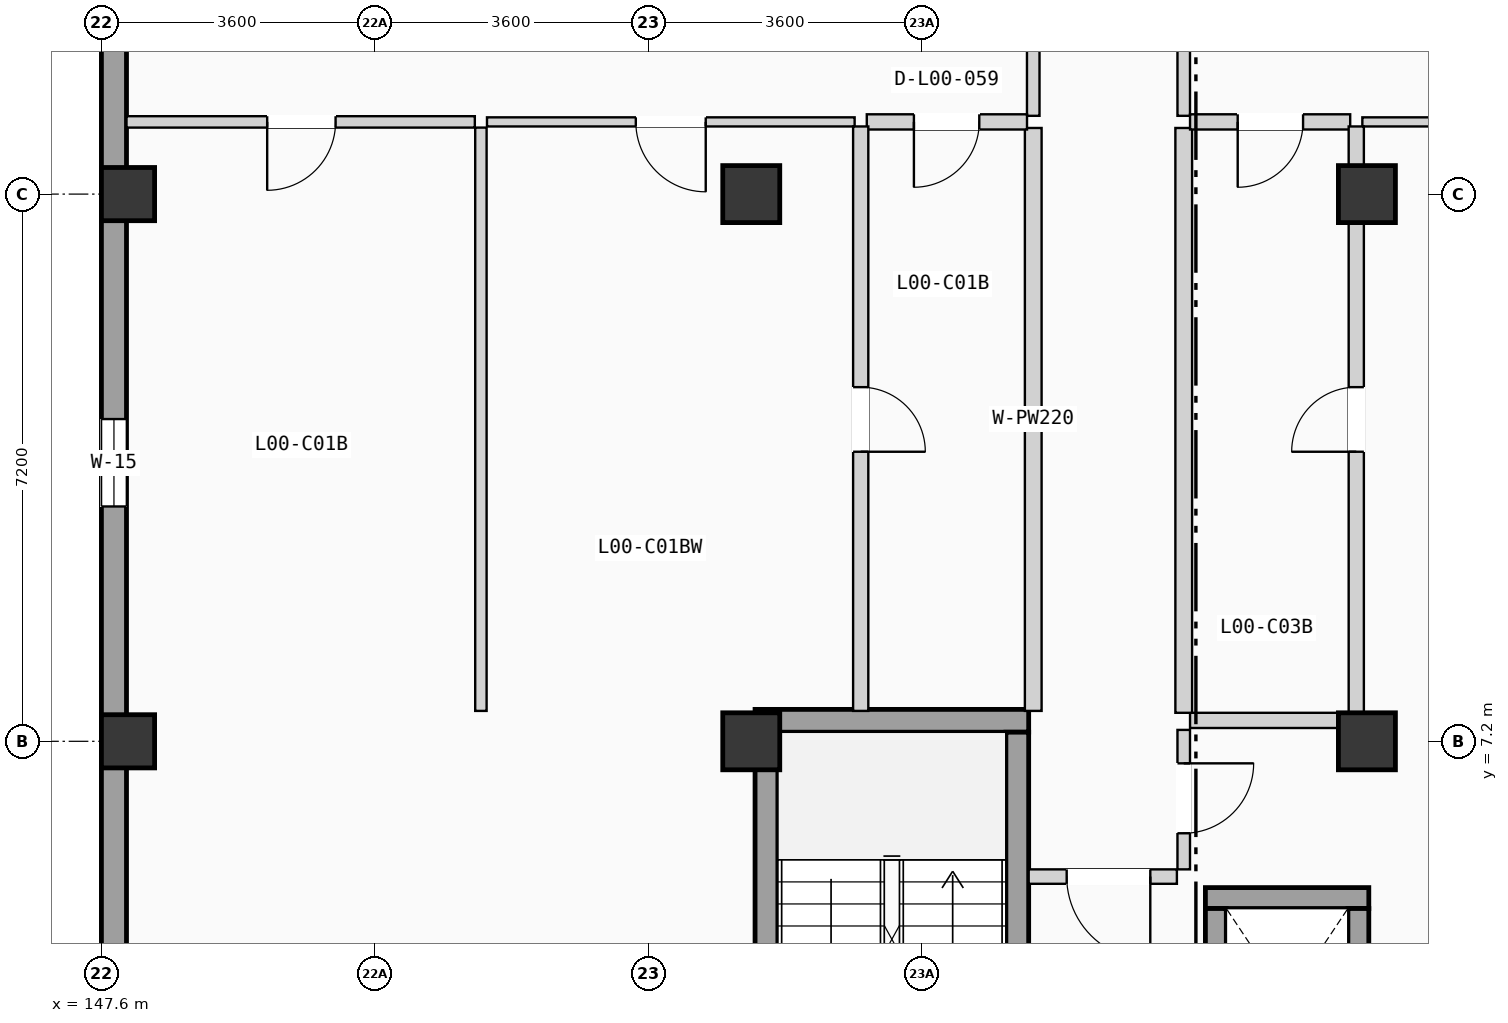
"""IFC4 building model, lengths in metres.
Left out: names, types, materials, properties, quantities, classifications, styles, units other than length and angle.
Written with IfcOpenShell. Run it as: python <this file> out.ifc"""

import sys

from ifc_helpers import new_model, si_unit, direction, frame, frame_2d, origin, origin_2d, place, context, subcontext, project, spatial, rectangle, extrude, element, fill, save


model = new_model("IFC4")
c1 = context("Model", 3, precision=1e-05, world=origin(), true_north=direction((0.0, 1.0)))
c2 = subcontext(c1, "Body", "Model", "MODEL_VIEW")
j1 = project(units=[si_unit("LENGTHUNIT", "METRE"), si_unit("PLANEANGLEUNIT", "RADIAN")], contexts=[c1])
p1 = place(None, origin())
s1 = spatial("IfcSite", under=j1, at=p1, CompositionType="ELEMENT")
p2 = place(p1, origin())
s2 = spatial("IfcBuilding", under=s1, at=p2, CompositionType="ELEMENT")
p3 = place(p2, origin())
s3 = spatial("IfcBuildingStorey", under=s2, at=p3, CompositionType="ELEMENT", Elevation=0.0)
for number, where, z_axis, x_axis in (
    (1, (147.95, 7.2, 0.0), (0.0, 0.0, 1.0), (1.0, 0.0, 0.0)),
    (2, (147.95, 14.4, 0.0), (0.0, 0.0, 1.0), (1.0, 0.0, 0.0)),
):
    element("IfcColumn", number, at=place(p3, frame(where, z_axis=z_axis, x_axis=x_axis)), inside=s3, PredefinedType="COLUMN", context=c2, shape_type="SweptSolid", body=[
        extrude(rectangle(XDim=0.7, YDim=0.7, at=origin_2d()), origin(), (0.0, 0.0, 1.0), 4.9),
    ])
for number, where, z_axis, x_axis in (
    (3, (156.15, 7.2, 0.0), (0.0, 0.0, 1.0), (1.0, 0.0, 0.0)),
    (4, (156.15, 14.4, 0.0), (0.0, 0.0, 1.0), (1.0, 0.0, 0.0)),
    (5, (164.25, 7.2, 0.0), (0.0, 0.0, 1.0), (1.0, 0.0, 0.0)),
    (6, (164.25, 14.4, 0.0), (0.0, 0.0, 1.0), (1.0, 0.0, 0.0)),
):
    element("IfcColumn", number, at=place(p3, frame(where, z_axis=z_axis, x_axis=x_axis)), inside=s3, PredefinedType="COLUMN", context=c2, shape_type="SweptSolid", body=[
        extrude(rectangle(XDim=0.75, YDim=0.75, at=origin_2d()), origin(), (0.0, 0.0, 1.0), 4.9),
    ])
p4 = place(p3, frame((147.765, 0.33, 0.0), z_axis=(0.0, 0.0, 1.0), x_axis=(0.0, 1.0, 0.0)))
e7 = element("IfcWall", 7, at=p4, inside=s3, PredefinedType="SOLIDWALL", context=c2, shape_type="SweptSolid", body=[
    extrude(rectangle(XDim=49.74, YDim=0.33, at=frame_2d((24.87, 0.0))), origin(), (0.0, 0.0, 1.0), 4.64),
])
p5 = place(p4, frame((17.095, 0.0, 0.9)))
e8 = element("IfcOpeningElement", 8, at=p5, cuts=e7, PredefinedType="OPENING", context=c2, shape_type="SweptSolid", body=[
    extrude(rectangle(XDim=1.15, YDim=1.65, at=frame_2d((0.575, 0.825))), frame((0.0, 0.175, 0.0), z_axis=(0.0, -1.0, 0.0), x_axis=(1.0, 0.0, 0.0)), (0.0, 0.0, 1.0), 0.35),
])
p6 = place(p4, frame((9.96, 0.0, 0.9)))
e9 = element("IfcOpeningElement", 9, at=p6, cuts=e7, PredefinedType="OPENING", context=c2, shape_type="SweptSolid", body=[
    extrude(rectangle(XDim=1.15, YDim=1.8, at=frame_2d((0.575, 0.9))), frame((0.0, 0.175, 0.0), z_axis=(0.0, -1.0, 0.0), x_axis=(1.0, 0.0, 0.0)), (0.0, 0.0, 1.0), 0.35),
])
p7 = place(p4, frame((24.245, 0.0, 0.9)))
e10 = element("IfcOpeningElement", 10, at=p7, cuts=e7, PredefinedType="OPENING", context=c2, shape_type="SweptSolid", body=[
    extrude(rectangle(XDim=1.25, YDim=1.2, at=frame_2d((0.625, 0.6))), frame((0.0, 0.175, 0.0), z_axis=(0.0, -1.0, 0.0), x_axis=(1.0, 0.0, 0.0)), (0.0, 0.0, 1.0), 0.35),
])
p8 = place(p4, frame((33.523, 0.0, 0.9)))
e11 = element("IfcOpeningElement", 11, at=p8, cuts=e7, PredefinedType="OPENING", context=c2, shape_type="SweptSolid", body=[
    extrude(rectangle(XDim=1.25, YDim=1.35, at=frame_2d((0.625, 0.675))), frame((0.0, 0.175, 0.0), z_axis=(0.0, -1.0, 0.0), x_axis=(1.0, 0.0, 0.0)), (0.0, 0.0, 1.0), 0.35),
])
p9 = place(p4, frame((30.114, 0.0, 0.9)))
e12 = element("IfcOpeningElement", 12, at=p9, cuts=e7, PredefinedType="OPENING", context=c2, shape_type="SweptSolid", body=[
    extrude(rectangle(XDim=1.25, YDim=1.5, at=frame_2d((0.625, 0.75))), frame((0.0, 0.175, 0.0), z_axis=(0.0, -1.0, 0.0), x_axis=(1.0, 0.0, 0.0)), (0.0, 0.0, 1.0), 0.35),
])
p10 = place(p4, frame((39.716, 0.0, 0.9)))
e13 = element("IfcOpeningElement", 13, at=p10, cuts=e7, PredefinedType="OPENING", context=c2, shape_type="SweptSolid", body=[
    extrude(rectangle(XDim=1.25, YDim=1.65, at=frame_2d((0.625, 0.825))), frame((0.0, 0.175, 0.0), z_axis=(0.0, -1.0, 0.0), x_axis=(1.0, 0.0, 0.0)), (0.0, 0.0, 1.0), 0.35),
])
p11 = place(p3, frame((156.2, 7.47, 0.0), z_axis=(0.0, 0.0, 1.0), x_axis=(1.0, 0.0, 0.0)))
e14 = element("IfcWall", 14, at=p11, inside=s3, PredefinedType="SHEAR", context=c2, shape_type="SweptSolid", body=[
    extrude(rectangle(XDim=3.6, YDim=0.3, at=frame_2d((1.8, 0.0))), origin(), (0.0, 0.0, 1.0), 4.64),
])
p12 = place(p3, frame((156.35, 0.32, 0.0), z_axis=(0.0, 0.0, 1.0), x_axis=(0.0, 1.0, 0.0)))
e15 = element("IfcWall", 15, at=p12, inside=s3, PredefinedType="SHEAR", context=c2, shape_type="SweptSolid", body=[
    extrude(rectangle(XDim=7.0, YDim=0.3, at=frame_2d((3.5, 0.0))), origin(), (0.0, 0.0, 1.0), 4.64),
])
p13 = place(p3, frame((159.65, 0.32, 0.0), z_axis=(0.0, 0.0, 1.0), x_axis=(0.0, 1.0, 0.0)))
e16 = element("IfcWall", 16, at=p13, inside=s3, PredefinedType="SHEAR", context=c2, shape_type="SweptSolid", body=[
    extrude(rectangle(XDim=7.0, YDim=0.3, at=frame_2d((3.5, 0.0))), origin(), (0.0, 0.0, 1.0), 4.64),
])
p14 = place(p13, frame((0.225, 0.0, 0.0)))
e17 = element("IfcOpeningElement", 17, at=p14, cuts=e16, PredefinedType="OPENING", context=c2, shape_type="SweptSolid", body=[
    extrude(rectangle(XDim=1.15, YDim=2.12, at=frame_2d((0.575, 1.06))), frame((0.0, 0.16, 0.0), z_axis=(0.0, -1.0, 0.0), x_axis=(1.0, 0.0, 0.0)), (0.0, 0.0, 1.0), 0.32),
])
p15 = place(p3, frame((162.125, 5.137, 0.0), z_axis=(0.0, 0.0, 1.0), x_axis=(1.0, 0.0, 0.0)))
e18 = element("IfcWall", 18, at=p15, inside=s3, PredefinedType="SHEAR", context=c2, shape_type="SweptSolid", body=[
    extrude(rectangle(XDim=2.15, YDim=0.275, at=frame_2d((1.075, 0.0))), origin(), (0.0, 0.0, 1.0), 4.64),
])
p16 = place(p3, frame((162.262, 2.6, 0.0), z_axis=(0.0, 0.0, 1.0), x_axis=(0.0, 1.0, 0.0)))
e19 = element("IfcWall", 19, at=p16, inside=s3, PredefinedType="SHEAR", context=c2, shape_type="SweptSolid", body=[
    extrude(rectangle(XDim=2.4, YDim=0.275, at=frame_2d((1.2, 0.0))), origin(), (0.0, 0.0, 1.0), 4.64),
])
p17 = place(p16, frame((0.65, 0.0, 0.0)))
e20 = element("IfcOpeningElement", 20, at=p17, cuts=e19, PredefinedType="OPENING", context=c2, shape_type="SweptSolid", body=[
    extrude(rectangle(XDim=1.1, YDim=2.15, at=frame_2d((0.55, 1.075))), frame((0.0, 0.147, 0.0), z_axis=(0.0, -1.0, 0.0), x_axis=(1.0, 0.0, 0.0)), (0.0, 0.0, 1.0), 0.295),
])
p18 = place(p3, frame((164.137, 2.6, 0.0), z_axis=(0.0, 0.0, 1.0), x_axis=(0.0, 1.0, 0.0)))
e21 = element("IfcWall", 21, at=p18, inside=s3, PredefinedType="SHEAR", context=c2, shape_type="SweptSolid", body=[
    extrude(rectangle(XDim=2.4, YDim=0.275, at=frame_2d((1.2, 0.0))), origin(), (0.0, 0.0, 1.0), 4.64),
])
p19 = place(p3, frame((159.8, 5.42, 0.0), z_axis=(0.0, 0.0, 1.0), x_axis=(1.0, 0.0, 0.0)))
e22 = element("IfcWall", 22, at=p19, inside=s3, PredefinedType="PARTITIONING", context=c2, shape_type="SweptSolid", body=[
    extrude(rectangle(XDim=1.95, YDim=0.19, at=frame_2d((0.975, 0.0))), origin(), (0.0, 0.0, 1.0), 3.84),
])
p20 = place(p19, frame((0.5, 0.0, 0.0)))
e23 = element("IfcOpeningElement", 23, at=p20, cuts=e22, PredefinedType="OPENING", context=c2, shape_type="SweptSolid", body=[
    extrude(rectangle(XDim=1.1, YDim=2.12, at=frame_2d((0.55, 1.06))), frame((0.0, 0.105, 0.0), z_axis=(0.0, -1.0, 0.0), x_axis=(1.0, 0.0, 0.0)), (0.0, 0.0, 1.0), 0.21),
])
p21 = place(p3, frame((161.84, 5.515, 0.0), z_axis=(0.0, 0.0, 1.0), x_axis=(0.0, 1.0, 0.0)))
e24 = element("IfcWall", 24, at=p21, inside=s3, PredefinedType="PARTITIONING", context=c2, shape_type="SweptSolid", body=[
    extrude(rectangle(XDim=1.835, YDim=0.165, at=frame_2d((0.917, 0.0))), origin(), (0.0, 0.0, 1.0), 3.84),
])
p22 = place(p21, frame((0.475, 0.0, 0.0)))
e25 = element("IfcOpeningElement", 25, at=p22, cuts=e24, PredefinedType="OPENING", context=c2, shape_type="SweptSolid", body=[
    extrude(rectangle(XDim=0.92, YDim=2.04, at=frame_2d((0.46, 1.02))), frame((0.0, 0.093, 0.0), z_axis=(0.0, -1.0, 0.0), x_axis=(1.0, 0.0, 0.0)), (0.0, 0.0, 1.0), 0.185),
])
p23 = place(p3, frame((161.923, 7.475, 0.0), z_axis=(0.0, 0.0, 1.0), x_axis=(1.0, 0.0, 0.0)))
e26 = element("IfcWall", 26, at=p23, inside=s3, PredefinedType="PLUMBINGWALL", context=c2, shape_type="SweptSolid", body=[
    extrude(rectangle(XDim=2.107, YDim=0.2, at=frame_2d((1.053, 0.0))), origin(), (0.0, 0.0, 1.0), 3.84),
])
p24 = place(p3, frame((159.86, 15.43, 0.0), z_axis=(0.0, 0.0, 1.0), x_axis=(0.0, 1.0, 0.0)))
e27 = element("IfcWall", 27, at=p24, inside=s3, PredefinedType="PARTITIONING", context=c2, shape_type="SweptSolid", body=[
    extrude(rectangle(XDim=5.14, YDim=0.165, at=frame_2d((2.57, 0.0))), origin(), (0.0, 0.0, 1.0), 3.84),
])
p25 = place(p24, frame((2.065, 0.0, 0.0)))
e28 = element("IfcOpeningElement", 28, at=p25, cuts=e27, PredefinedType="OPENING", context=c2, shape_type="SweptSolid", body=[
    extrude(rectangle(XDim=1.01, YDim=2.11, at=frame_2d((0.505, 1.055))), frame((0.0, 0.093, 0.0), z_axis=(0.0, -1.0, 0.0), x_axis=(1.0, 0.0, 0.0)), (0.0, 0.0, 1.0), 0.185),
])
p26 = place(p3, frame((159.86, 7.6, 0.0), z_axis=(0.0, 0.0, 1.0), x_axis=(0.0, 1.0, 0.0)))
e29 = element("IfcWall", 29, at=p26, inside=s3, PredefinedType="PLUMBINGWALL", context=c2, shape_type="SweptSolid", body=[
    extrude(rectangle(XDim=7.67, YDim=0.22, at=frame_2d((3.835, 0.0))), origin(), (0.0, 0.0, 1.0), 3.84),
])
p27 = place(p3, frame((161.84, 15.43, 0.0), z_axis=(0.0, 0.0, 1.0), x_axis=(0.0, 1.0, 0.0)))
e30 = element("IfcWall", 30, at=p27, inside=s3, PredefinedType="PARTITIONING", context=c2, shape_type="SweptSolid", body=[
    extrude(rectangle(XDim=5.14, YDim=0.165, at=frame_2d((2.57, 0.0))), origin(), (0.0, 0.0, 1.0), 3.84),
])
p28 = place(p27, frame((2.065, 0.0, 0.0)))
e31 = element("IfcOpeningElement", 31, at=p28, cuts=e30, PredefinedType="OPENING", context=c2, shape_type="SweptSolid", body=[
    extrude(rectangle(XDim=1.01, YDim=2.11, at=frame_2d((0.505, 1.055))), frame((0.0, 0.093, 0.0), z_axis=(0.0, -1.0, 0.0), x_axis=(1.0, 0.0, 0.0)), (0.0, 0.0, 1.0), 0.185),
])
p29 = place(p3, frame((161.84, 7.575, 0.0), z_axis=(0.0, 0.0, 1.0), x_axis=(0.0, 1.0, 0.0)))
e32 = element("IfcWall", 32, at=p29, inside=s3, PredefinedType="PLUMBINGWALL", context=c2, shape_type="SweptSolid", body=[
    extrude(rectangle(XDim=7.695, YDim=0.22, at=frame_2d((3.848, 0.0))), origin(), (0.0, 0.0, 1.0), 3.84),
])
p30 = place(p3, frame((157.67, 15.35, 0.0), z_axis=(0.0, 0.0, 1.0), x_axis=(1.0, 0.0, 0.0)))
e33 = element("IfcWall", 33, at=p30, inside=s3, PredefinedType="PLUMBINGWALL", context=c2, shape_type="SweptSolid", body=[
    extrude(rectangle(XDim=2.108, YDim=0.2, at=frame_2d((1.054, 0.0))), origin(), (0.0, 0.0, 1.0), 3.84),
])
p31 = place(p30, frame((0.62, 0.0, 0.0)))
e34 = element("IfcOpeningElement", 34, at=p31, cuts=e33, PredefinedType="OPENING", context=c2, shape_type="SweptSolid", body=[
    extrude(rectangle(XDim=0.86, YDim=2.0, at=frame_2d((0.43, 1.0))), frame((0.0, 0.11, 0.0), z_axis=(0.0, -1.0, 0.0), x_axis=(1.0, 0.0, 0.0)), (0.0, 0.0, 1.0), 0.22),
])
p32 = place(p3, frame((147.93, 15.35, 0.0), z_axis=(0.0, 0.0, 1.0), x_axis=(1.0, 0.0, 0.0)))
e35 = element("IfcWall", 35, at=p32, inside=s3, PredefinedType="PARTITIONING", context=c2, shape_type="SweptSolid", body=[
    extrude(rectangle(XDim=4.583, YDim=0.15, at=frame_2d((2.292, 0.0))), origin(), (0.0, 0.0, 1.0), 3.84),
])
p33 = place(p32, frame((1.851, 0.0, 0.0)))
e36 = element("IfcOpeningElement", 36, at=p33, cuts=e35, PredefinedType="OPENING", context=c2, shape_type="SweptSolid", body=[
    extrude(rectangle(XDim=0.9, YDim=2.04, at=frame_2d((0.45, 1.02))), frame((0.0, 0.085, 0.0), z_axis=(0.0, -1.0, 0.0), x_axis=(1.0, 0.0, 0.0)), (0.0, 0.0, 1.0), 0.17),
])
p34 = place(p3, frame((152.673, 15.35, 0.0), z_axis=(0.0, 0.0, 1.0), x_axis=(1.0, 0.0, 0.0)))
e37 = element("IfcWall", 37, at=p34, inside=s3, PredefinedType="PARTITIONING", context=c2, shape_type="SweptSolid", body=[
    extrude(rectangle(XDim=4.837, YDim=0.12, at=frame_2d((2.418, 0.0))), origin(), (0.0, 0.0, 1.0), 3.84),
])
p35 = place(p34, frame((1.958, 0.0, 0.0)))
e38 = element("IfcOpeningElement", 38, at=p35, cuts=e37, PredefinedType="OPENING", context=c2, shape_type="SweptSolid", body=[
    extrude(rectangle(XDim=0.92, YDim=2.02, at=frame_2d((0.46, 1.01))), frame((0.0, 0.07, 0.0), z_axis=(0.0, -1.0, 0.0), x_axis=(1.0, 0.0, 0.0)), (0.0, 0.0, 1.0), 0.14),
])
p36 = place(p3, frame((157.59, 7.6, 0.0), z_axis=(0.0, 0.0, 1.0), x_axis=(0.0, 1.0, 0.0)))
e39 = element("IfcWall", 39, at=p36, inside=s3, PredefinedType="PLUMBINGWALL", context=c2, shape_type="SweptSolid", body=[
    extrude(rectangle(XDim=7.69, YDim=0.2, at=frame_2d((3.845, 0.0))), origin(), (0.0, 0.0, 1.0), 3.84),
])
p37 = place(p36, frame((3.41, 0.0, 0.0)))
e40 = element("IfcOpeningElement", 40, at=p37, cuts=e39, PredefinedType="OPENING", context=c2, shape_type="SweptSolid", body=[
    extrude(rectangle(XDim=0.85, YDim=2.01, at=frame_2d((0.425, 1.005))), frame((0.0, 0.11, 0.0), z_axis=(0.0, -1.0, 0.0), x_axis=(1.0, 0.0, 0.0)), (0.0, 0.0, 1.0), 0.22),
])
p38 = place(p3, frame((152.593, 7.6, 0.0), z_axis=(0.0, 0.0, 1.0), x_axis=(0.0, 1.0, 0.0)))
e41 = element("IfcWall", 41, at=p38, inside=s3, PredefinedType="PARTITIONING", context=c2, shape_type="SweptSolid", body=[
    extrude(rectangle(XDim=7.675, YDim=0.15, at=frame_2d((3.837, 0.0))), origin(), (0.0, 0.0, 1.0), 3.84),
])
p39 = place(p3, frame((161.923, 15.35, 0.0), z_axis=(0.0, 0.0, 1.0), x_axis=(1.0, 0.0, 0.0)))
e42 = element("IfcWall", 42, at=p39, inside=s3, PredefinedType="PLUMBINGWALL", context=c2, shape_type="SweptSolid", body=[
    extrude(rectangle(XDim=2.107, YDim=0.2, at=frame_2d((1.053, 0.0))), origin(), (0.0, 0.0, 1.0), 3.84),
])
p40 = place(p39, frame((0.627, 0.0, 0.0)))
e43 = element("IfcOpeningElement", 43, at=p40, cuts=e42, PredefinedType="OPENING", context=c2, shape_type="SweptSolid", body=[
    extrude(rectangle(XDim=0.86, YDim=2.0, at=frame_2d((0.43, 1.0))), frame((0.0, 0.11, 0.0), z_axis=(0.0, -1.0, 0.0), x_axis=(1.0, 0.0, 0.0)), (0.0, 0.0, 1.0), 0.22),
])
p41 = place(p3, frame((164.19, 15.35, 0.0), z_axis=(0.0, 0.0, 1.0), x_axis=(1.0, 0.0, 0.0)))
e44 = element("IfcWall", 44, at=p41, inside=s3, PredefinedType="PARTITIONING", context=c2, shape_type="SweptSolid", body=[
    extrude(rectangle(XDim=3.537, YDim=0.12, at=frame_2d((1.769, 0.0))), origin(), (0.0, 0.0, 1.0), 3.84),
])
p42 = place(p41, frame((1.329, 0.0, 0.0)))
e45 = element("IfcOpeningElement", 45, at=p42, cuts=e44, PredefinedType="OPENING", context=c2, shape_type="SweptSolid", body=[
    extrude(rectangle(XDim=0.88, YDim=2.02, at=frame_2d((0.44, 1.01))), frame((0.0, 0.07, 0.0), z_axis=(0.0, -1.0, 0.0), x_axis=(1.0, 0.0, 0.0)), (0.0, 0.0, 1.0), 0.14),
])
p43 = place(p3, frame((164.11, 7.575, 0.0), z_axis=(0.0, 0.0, 1.0), x_axis=(0.0, 1.0, 0.0)))
e46 = element("IfcWall", 46, at=p43, inside=s3, PredefinedType="PLUMBINGWALL", context=c2, shape_type="SweptSolid", body=[
    extrude(rectangle(XDim=7.715, YDim=0.2, at=frame_2d((3.857, 0.0))), origin(), (0.0, 0.0, 1.0), 3.84),
])
p44 = place(p43, frame((3.435, 0.0, 0.0)))
e47 = element("IfcOpeningElement", 47, at=p44, cuts=e46, PredefinedType="OPENING", context=c2, shape_type="SweptSolid", body=[
    extrude(rectangle(XDim=0.85, YDim=2.01, at=frame_2d((0.425, 1.005))), frame((0.0, 0.11, 0.0), z_axis=(0.0, -1.0, 0.0), x_axis=(1.0, 0.0, 0.0)), (0.0, 0.0, 1.0), 0.22),
])
p45 = place(p6, origin())
e48 = element("IfcWindow", 48, at=p45, inside=s3, PartitioningType="SINGLE_PANEL", PredefinedType="WINDOW", context=c2, shape_type="SweptSolid", body=[
    extrude(rectangle(XDim=1.15, YDim=1.8, at=frame_2d((0.575, 0.9))), frame((0.0, 0.03, 0.0), z_axis=(0.0, -1.0, 0.0), x_axis=(1.0, 0.0, 0.0)), (0.0, 0.0, 1.0), 0.06),
])
fill(e9, e48)
p46 = place(p20, frame((1.1, 0.0, 0.0), z_axis=(0.0, 0.0, 1.0), x_axis=(-1.0, 0.0, 0.0)))
e49 = element("IfcDoor", 49, at=p46, inside=s3, OperationType="SINGLE_SWING_RIGHT", PredefinedType="DOOR", context=c2, shape_type="SweptSolid", body=[
    extrude(rectangle(XDim=1.1, YDim=2.12, at=frame_2d((0.55, 1.06))), frame((0.0, 0.025, 0.0), z_axis=(0.0, -1.0, 0.0), x_axis=(1.0, 0.0, 0.0)), (0.0, 0.0, 1.0), 0.05),
])
fill(e23, e49)
p47 = place(p22, frame((0.92, 0.0, 0.0), z_axis=(0.0, 0.0, 1.0), x_axis=(-1.0, 0.0, 0.0)))
e50 = element("IfcDoor", 50, at=p47, inside=s3, OperationType="SINGLE_SWING_RIGHT", PredefinedType="DOOR", context=c2, shape_type="SweptSolid", body=[
    extrude(rectangle(XDim=0.92, YDim=2.04, at=frame_2d((0.46, 1.02))), frame((0.0, 0.025, 0.0), z_axis=(0.0, -1.0, 0.0), x_axis=(1.0, 0.0, 0.0)), (0.0, 0.0, 1.0), 0.05),
])
fill(e25, e50)
p48 = place(p31, frame((0.86, 0.0, 0.0), z_axis=(0.0, 0.0, 1.0), x_axis=(-1.0, 0.0, 0.0)))
e51 = element("IfcDoor", 51, at=p48, inside=s3, OperationType="SINGLE_SWING_LEFT", PredefinedType="DOOR", context=c2, shape_type="SweptSolid", body=[
    extrude(rectangle(XDim=0.86, YDim=2.0, at=frame_2d((0.43, 1.0))), frame((0.0, 0.025, 0.0), z_axis=(0.0, -1.0, 0.0), x_axis=(1.0, 0.0, 0.0)), (0.0, 0.0, 1.0), 0.05),
])
fill(e34, e51)
p49 = place(p33, frame((0.9, 0.0, 0.0), z_axis=(0.0, 0.0, 1.0), x_axis=(-1.0, 0.0, 0.0)))
e52 = element("IfcDoor", 52, at=p49, inside=s3, OperationType="SINGLE_SWING_LEFT", PredefinedType="DOOR", context=c2, shape_type="SweptSolid", body=[
    extrude(rectangle(XDim=0.9, YDim=2.04, at=frame_2d((0.45, 1.02))), frame((0.0, 0.025, 0.0), z_axis=(0.0, -1.0, 0.0), x_axis=(1.0, 0.0, 0.0)), (0.0, 0.0, 1.0), 0.05),
])
fill(e36, e52)
p50 = place(p35, frame((0.92, 0.0, 0.0), z_axis=(0.0, 0.0, 1.0), x_axis=(-1.0, 0.0, 0.0)))
e53 = element("IfcDoor", 53, at=p50, inside=s3, OperationType="SINGLE_SWING_RIGHT", PredefinedType="DOOR", context=c2, shape_type="SweptSolid", body=[
    extrude(rectangle(XDim=0.92, YDim=2.02, at=frame_2d((0.46, 1.01))), frame((0.0, 0.025, 0.0), z_axis=(0.0, -1.0, 0.0), x_axis=(1.0, 0.0, 0.0)), (0.0, 0.0, 1.0), 0.05),
])
fill(e38, e53)
p51 = place(p37, frame((0.85, 0.0, 0.0), z_axis=(0.0, 0.0, 1.0), x_axis=(-1.0, 0.0, 0.0)))
e54 = element("IfcDoor", 54, at=p51, inside=s3, OperationType="SINGLE_SWING_LEFT", PredefinedType="DOOR", context=c2, shape_type="SweptSolid", body=[
    extrude(rectangle(XDim=0.85, YDim=2.01, at=frame_2d((0.425, 1.005))), frame((0.0, 0.025, 0.0), z_axis=(0.0, -1.0, 0.0), x_axis=(1.0, 0.0, 0.0)), (0.0, 0.0, 1.0), 0.05),
])
fill(e40, e54)
p52 = place(p40, frame((0.86, 0.0, 0.0), z_axis=(0.0, 0.0, 1.0), x_axis=(-1.0, 0.0, 0.0)))
e55 = element("IfcDoor", 55, at=p52, inside=s3, OperationType="SINGLE_SWING_LEFT", PredefinedType="DOOR", context=c2, shape_type="SweptSolid", body=[
    extrude(rectangle(XDim=0.86, YDim=2.0, at=frame_2d((0.43, 1.0))), frame((0.0, 0.025, 0.0), z_axis=(0.0, -1.0, 0.0), x_axis=(1.0, 0.0, 0.0)), (0.0, 0.0, 1.0), 0.05),
])
fill(e43, e55)
p53 = place(p44, origin())
e56 = element("IfcDoor", 56, at=p53, inside=s3, OperationType="SINGLE_SWING_LEFT", PredefinedType="DOOR", context=c2, shape_type="SweptSolid", body=[
    extrude(rectangle(XDim=0.85, YDim=2.01, at=frame_2d((0.425, 1.005))), frame((0.0, 0.025, 0.0), z_axis=(0.0, -1.0, 0.0), x_axis=(1.0, 0.0, 0.0)), (0.0, 0.0, 1.0), 0.05),
])
fill(e47, e56)
save(model, sys.argv[1])
